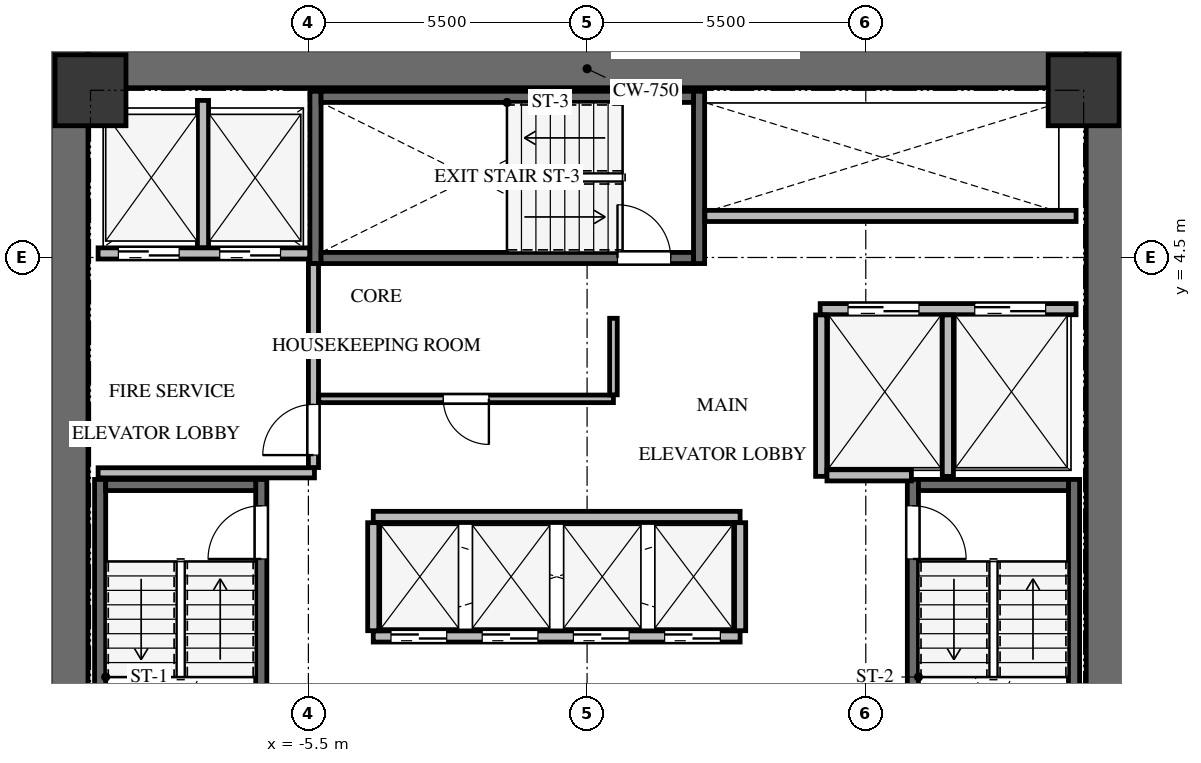
"""IFC4 building model, lengths in metres.
Left out: names, types, materials, properties, quantities, classifications, styles, units other than length and angle.
Written with IfcOpenShell. Run it as: python <this file> out.ifc"""

import sys

from ifc_helpers import new_model, si_unit, direction, frame, frame_2d, origin, origin_2d, place, context, subcontext, project, spatial, rectangle, extrude, source, transform, mapped, element, fill, save


model = new_model("IFC4")
c1 = context("Model", 3, precision=1e-05, world=origin(), true_north=direction((0.0, 1.0)))
c2 = subcontext(c1, "Body", "Model", "MODEL_VIEW")
j1 = project(units=[si_unit("LENGTHUNIT", "METRE"), si_unit("PLANEANGLEUNIT", "RADIAN")], contexts=[c1])
p1 = place(None, origin())
s1 = spatial("IfcSite", under=j1, at=p1, CompositionType="ELEMENT")
p2 = place(p1, origin())
s2 = spatial("IfcBuilding", under=s1, at=p2, CompositionType="ELEMENT")
p3 = place(p2, frame((0.0, 0.0, 140.1)))
s3 = spatial("IfcBuildingStorey", under=s2, at=p3, CompositionType="ELEMENT", Elevation=140.1)
for number, where, z_axis, x_axis in (
    (1, (-10.225, -8.6, 0.0), (0.0, 0.0, 1.0), (0.0, 1.0, 0.0)),
    (2, (10.225, -8.6, 0.0), (0.0, 0.0, 1.0), (0.0, 1.0, 0.0)),
):
    element("IfcWall", number, at=place(p3, frame(where, z_axis=z_axis, x_axis=x_axis)), inside=s3, PredefinedType="SHEAR", context=c2, shape_type="SweptSolid", body=[
        extrude(rectangle(XDim=17.2, YDim=0.75, at=frame_2d((8.6, 0.0))), origin(), (0.0, 0.0, 1.0), 3.0),
    ])
p4 = place(p3, frame((-9.85, 8.225, 0.0), z_axis=(0.0, 0.0, 1.0), x_axis=(1.0, 0.0, 0.0)))
e3 = element("IfcWall", 3, at=p4, inside=s3, PredefinedType="SHEAR", context=c2, shape_type="SweptSolid", body=[
    extrude(rectangle(XDim=19.7, YDim=0.75, at=frame_2d((9.85, 0.0))), origin(), (0.0, 0.0, 1.0), 3.0),
])
p5 = place(p3, frame((-6.43, -7.77, -0.24), z_axis=(0.0, 0.0, 1.0), x_axis=(0.0, 1.0, 0.0)))
e4 = element("IfcWall", 4, at=p5, inside=s3, PredefinedType="SHEAR", context=c2, shape_type="SweptSolid", body=[
    extrude(rectangle(XDim=7.89, YDim=0.22, at=frame_2d((3.945, 0.0))), origin(), (0.0, 0.0, 1.0), 3.0),
])
p6 = place(p5, frame((6.32, 0.0, 0.0)))
e5 = element("IfcOpeningElement", 5, at=p6, cuts=e4, PredefinedType="OPENING", context=c2, shape_type="SweptSolid", body=[
    extrude(rectangle(XDim=1.05, YDim=2.15, at=frame_2d((0.525, 1.075))), frame((0.0, 0.12, 0.0), z_axis=(0.0, -1.0, 0.0), x_axis=(1.0, 0.0, 0.0)), (0.0, 0.0, 1.0), 0.24),
])
p7 = place(p3, frame((-9.61, 0.12, -0.24), z_axis=(0.0, 0.0, 1.0), x_axis=(0.0, -1.0, 0.0)))
e6 = element("IfcWall", 6, at=p7, inside=s3, PredefinedType="SHEAR", context=c2, shape_type="SweptSolid", body=[
    extrude(rectangle(XDim=7.89, YDim=0.22, at=frame_2d((3.945, 0.0))), origin(), (0.0, 0.0, 1.0), 3.0),
])
p8 = place(p3, frame((-6.54, 0.01, -0.24), z_axis=(0.0, 0.0, 1.0), x_axis=(-1.0, 0.0, 0.0)))
e7 = element("IfcWall", 7, at=p8, inside=s3, PredefinedType="SHEAR", context=c2, shape_type="SweptSolid", body=[
    extrude(rectangle(XDim=2.96, YDim=0.22, at=frame_2d((1.48, 0.0))), origin(), (0.0, 0.0, 1.0), 3.0),
])
p9 = place(p3, frame((9.61, -7.77, -0.24), z_axis=(0.0, 0.0, 1.0), x_axis=(0.0, 1.0, 0.0)))
e8 = element("IfcWall", 8, at=p9, inside=s3, PredefinedType="SHEAR", context=c2, shape_type="SweptSolid", body=[
    extrude(rectangle(XDim=7.89, YDim=0.22, at=frame_2d((3.945, 0.0))), origin(), (0.0, 0.0, 1.0), 3.0),
])
p10 = place(p3, frame((6.43, 0.12, -0.24), z_axis=(0.0, 0.0, 1.0), x_axis=(0.0, -1.0, 0.0)))
e9 = element("IfcWall", 9, at=p10, inside=s3, PredefinedType="SHEAR", context=c2, shape_type="SweptSolid", body=[
    extrude(rectangle(XDim=7.89, YDim=0.22, at=frame_2d((3.945, 0.0))), origin(), (0.0, 0.0, 1.0), 3.0),
])
p11 = place(p10, frame((0.52, 0.0, 0.0)))
e10 = element("IfcOpeningElement", 10, at=p11, cuts=e9, PredefinedType="OPENING", context=c2, shape_type="SweptSolid", body=[
    extrude(rectangle(XDim=1.05, YDim=2.15, at=frame_2d((0.525, 1.075))), frame((0.0, 0.12, 0.0), z_axis=(0.0, -1.0, 0.0), x_axis=(1.0, 0.0, 0.0)), (0.0, 0.0, 1.0), 0.24),
])
p12 = place(p3, frame((9.5, 0.01, -0.24), z_axis=(0.0, 0.0, 1.0), x_axis=(-1.0, 0.0, 0.0)))
e11 = element("IfcWall", 11, at=p12, inside=s3, PredefinedType="SHEAR", context=c2, shape_type="SweptSolid", body=[
    extrude(rectangle(XDim=2.96, YDim=0.22, at=frame_2d((1.48, 0.0))), origin(), (0.0, 0.0, 1.0), 3.0),
])
for number, where, z_axis, x_axis in (
    (12, (2.21, 4.38, -0.24), (0.0, 0.0, 1.0), (0.0, 1.0, 0.0)),
    (13, (-5.36, 7.78, -0.24), (0.0, 0.0, 1.0), (0.0, -1.0, 0.0)),
):
    element("IfcWall", number, at=place(p3, frame(where, z_axis=z_axis, x_axis=x_axis)), inside=s3, PredefinedType="SHEAR", context=c2, shape_type="SweptSolid", body=[
        extrude(rectangle(XDim=3.4, YDim=0.22, at=frame_2d((1.7, 0.0))), origin(), (0.0, 0.0, 1.0), 3.0),
    ])
p13 = place(p3, frame((-5.25, 4.49, -0.24), z_axis=(0.0, 0.0, 1.0), x_axis=(1.0, 0.0, 0.0)))
e14 = element("IfcWall", 14, at=p13, inside=s3, PredefinedType="SHEAR", context=c2, shape_type="SweptSolid", body=[
    extrude(rectangle(XDim=7.35, YDim=0.22, at=frame_2d((3.675, 0.0))), origin(), (0.0, 0.0, 1.0), 3.0),
])
p14 = place(p13, frame((5.85, 0.0, 0.0)))
e15 = element("IfcOpeningElement", 15, at=p14, cuts=e14, PredefinedType="OPENING", context=c2, shape_type="SweptSolid", body=[
    extrude(rectangle(XDim=1.05, YDim=2.15, at=frame_2d((0.525, 1.075))), frame((0.0, 0.12, 0.0), z_axis=(0.0, -1.0, 0.0), x_axis=(1.0, 0.0, 0.0)), (0.0, 0.0, 1.0), 0.24),
])
p15 = place(p3, frame((2.1, 7.67, -0.24), z_axis=(0.0, 0.0, 1.0), x_axis=(-1.0, 0.0, 0.0)))
e16 = element("IfcWall", 16, at=p15, inside=s3, PredefinedType="SHEAR", context=c2, shape_type="SweptSolid", body=[
    extrude(rectangle(XDim=7.35, YDim=0.22, at=frame_2d((3.675, 0.0))), origin(), (0.0, 0.0, 1.0), 3.0),
])
m1 = source(origin(), c2, "Body", "SweptSolid", [
    extrude(rectangle(XDim=1.4, YDim=1.4, at=origin_2d()), origin(), (0.0, 0.0, 1.0), 3.0),
])
for number, where, z_axis, x_axis in (
    (17, (9.8, 7.8, -0.24), (0.0, 0.0, 1.0), (1.0, 0.0, 0.0)),
    (18, (-9.8, 7.8, -0.24), (0.0, 0.0, 1.0), (1.0, 0.0, 0.0)),
):
    element("IfcColumn", number, at=place(p3, frame(where, z_axis=z_axis, x_axis=x_axis)), inside=s3, PredefinedType="COLUMN", context=c2, shape_type="MappedRepresentation", body=[
        mapped(m1, transform((0.0, 0.0, 0.0), x_axis=(1.0, 0.0, 0.0), y_axis=(0.0, 1.0, 0.0), z_axis=(0.0, 0.0, 1.0), scale=1.0)),
    ])
p16 = place(p3, frame((-9.65, 4.58, 0.0), z_axis=(0.0, 0.0, 1.0), x_axis=(1.0, 0.0, 0.0)))
e19 = element("IfcWall", 19, at=p16, inside=s3, PredefinedType="SOLIDWALL", context=c2, shape_type="SweptSolid", body=[
    extrude(rectangle(XDim=4.175, YDim=0.22, at=frame_2d((2.087, 0.0))), origin(), (0.0, 0.0, 1.0), 2.745),
])
p17 = place(p16, frame((0.4, 0.0, 0.0)))
e20 = element("IfcOpeningElement", 20, at=p17, cuts=e19, PredefinedType="OPENING", context=c2, shape_type="SweptSolid", body=[
    extrude(rectangle(XDim=1.2, YDim=2.15, at=frame_2d((0.6, 1.075))), frame((0.0, 0.12, 0.0), z_axis=(0.0, -1.0, 0.0), x_axis=(1.0, 0.0, 0.0)), (0.0, 0.0, 1.0), 0.24),
])
p18 = place(p16, frame((2.4, 0.0, 0.0)))
e21 = element("IfcOpeningElement", 21, at=p18, cuts=e19, PredefinedType="OPENING", context=c2, shape_type="SweptSolid", body=[
    extrude(rectangle(XDim=1.2, YDim=2.15, at=frame_2d((0.6, 1.075))), frame((0.0, 0.12, 0.0), z_axis=(0.0, -1.0, 0.0), x_axis=(1.0, 0.0, 0.0)), (0.0, 0.0, 1.0), 0.24),
])
p19 = place(p3, frame((-7.58, 4.694, 0.0), z_axis=(0.0, 0.0, 1.0), x_axis=(0.0, 1.0, 0.0)))
e22 = element("IfcWall", 22, at=p19, inside=s3, PredefinedType="SOLIDWALL", context=c2, shape_type="SweptSolid", body=[
    extrude(rectangle(XDim=2.906, YDim=0.22, at=frame_2d((1.453, 0.0))), origin(), (0.0, 0.0, 1.0), 2.745),
])
p20 = place(p3, frame((-9.65, 0.25, 0.0), z_axis=(0.0, 0.0, 1.0), x_axis=(1.0, 0.0, 0.0)))
e23 = element("IfcWall", 23, at=p20, inside=s3, PredefinedType="SOLIDWALL", context=c2, shape_type="SweptSolid", body=[
    extrude(rectangle(XDim=4.27, YDim=0.2, at=frame_2d((2.135, 0.0))), origin(), (0.0, 0.0, 1.0), 2.745),
])
p21 = place(p3, frame((-5.4, 0.354, 0.0), z_axis=(0.0, 0.0, 1.0), x_axis=(0.0, 1.0, 0.0)))
e24 = element("IfcWall", 24, at=p21, inside=s3, PredefinedType="SOLIDWALL", context=c2, shape_type="SweptSolid", body=[
    extrude(rectangle(XDim=4.026, YDim=0.2, at=frame_2d((2.013, 0.0))), origin(), (0.0, 0.0, 1.0), 2.745),
])
p22 = place(p21, frame((0.246, 0.0, 0.0)))
e25 = element("IfcOpeningElement", 25, at=p22, cuts=e24, PredefinedType="OPENING", context=c2, shape_type="SweptSolid", body=[
    extrude(rectangle(XDim=1.0, YDim=2.15, at=frame_2d((0.5, 1.075))), frame((0.0, 0.11, 0.0), z_axis=(0.0, -1.0, 0.0), x_axis=(1.0, 0.0, 0.0)), (0.0, 0.0, 1.0), 0.22),
])
p23 = place(p3, frame((4.6, 3.48, 0.0), z_axis=(0.0, 0.0, 1.0), x_axis=(1.0, 0.0, 0.0)))
e26 = element("IfcWall", 26, at=p23, inside=s3, PredefinedType="SOLIDWALL", context=c2, shape_type="SweptSolid", body=[
    extrude(rectangle(XDim=5.05, YDim=0.22, at=frame_2d((2.525, 0.0))), origin(), (0.0, 0.0, 1.0), 2.745),
])
p24 = place(p23, frame((0.55, 0.0, 0.0)))
e27 = element("IfcOpeningElement", 27, at=p24, cuts=e26, PredefinedType="OPENING", context=c2, shape_type="SweptSolid", body=[
    extrude(rectangle(XDim=1.4, YDim=2.15, at=frame_2d((0.7, 1.075))), frame((0.0, 0.12, 0.0), z_axis=(0.0, -1.0, 0.0), x_axis=(1.0, 0.0, 0.0)), (0.0, 0.0, 1.0), 0.24),
])
p25 = place(p23, frame((3.05, 0.0, 0.0)))
e28 = element("IfcOpeningElement", 28, at=p25, cuts=e26, PredefinedType="OPENING", context=c2, shape_type="SweptSolid", body=[
    extrude(rectangle(XDim=1.4, YDim=2.15, at=frame_2d((0.7, 1.075))), frame((0.0, 0.12, 0.0), z_axis=(0.0, -1.0, 0.0), x_axis=(1.0, 0.0, 0.0)), (0.0, 0.0, 1.0), 0.24),
])
for number, where, z_axis, x_axis in (
    (29, (4.62, 0.18, 0.0), (0.0, 0.0, 1.0), (0.0, 1.0, 0.0)),
    (30, (7.12, 0.18, 0.0), (0.0, 0.0, 1.0), (0.0, 1.0, 0.0)),
):
    element("IfcWall", number, at=place(p3, frame(where, z_axis=z_axis, x_axis=x_axis)), inside=s3, PredefinedType="SOLIDWALL", context=c2, shape_type="SweptSolid", body=[
        extrude(rectangle(XDim=3.186, YDim=0.22, at=frame_2d((1.593, 0.0))), origin(), (0.0, 0.0, 1.0), 2.745),
    ])
p26 = place(p3, frame((4.734, 0.2, 0.0), z_axis=(0.0, 0.0, 1.0), x_axis=(1.0, 0.0, 0.0)))
e31 = element("IfcWall", 31, at=p26, inside=s3, PredefinedType="SOLIDWALL", context=c2, shape_type="SweptSolid", body=[
    extrude(rectangle(XDim=1.666, YDim=0.22, at=frame_2d((0.833, 0.0))), origin(), (0.0, 0.0, 1.0), 2.745),
])
p27 = place(p3, frame((-4.22, -2.98, 0.0), z_axis=(0.0, 0.0, 1.0), x_axis=(1.0, 0.0, 0.0)))
e32 = element("IfcWall", 32, at=p27, inside=s3, PredefinedType="SOLIDWALL", context=c2, shape_type="SweptSolid", body=[
    extrude(rectangle(XDim=7.24, YDim=0.22, at=frame_2d((3.62, 0.0))), origin(), (0.0, 0.0, 1.0), 2.745),
])
p28 = place(p27, frame((0.35, 0.0, 0.0)))
e33 = element("IfcOpeningElement", 33, at=p28, cuts=e32, PredefinedType="OPENING", context=c2, shape_type="SweptSolid", body=[
    extrude(rectangle(XDim=1.1, YDim=2.15, at=frame_2d((0.55, 1.075))), frame((0.0, 0.12, 0.0), z_axis=(0.0, -1.0, 0.0), x_axis=(1.0, 0.0, 0.0)), (0.0, 0.0, 1.0), 0.24),
])
p29 = place(p27, frame((2.15, 0.0, 0.0)))
e34 = element("IfcOpeningElement", 34, at=p29, cuts=e32, PredefinedType="OPENING", context=c2, shape_type="SweptSolid", body=[
    extrude(rectangle(XDim=1.1, YDim=2.15, at=frame_2d((0.55, 1.075))), frame((0.0, 0.12, 0.0), z_axis=(0.0, -1.0, 0.0), x_axis=(1.0, 0.0, 0.0)), (0.0, 0.0, 1.0), 0.24),
])
p30 = place(p27, frame((3.95, 0.0, 0.0)))
e35 = element("IfcOpeningElement", 35, at=p30, cuts=e32, PredefinedType="OPENING", context=c2, shape_type="SweptSolid", body=[
    extrude(rectangle(XDim=1.1, YDim=2.15, at=frame_2d((0.55, 1.075))), frame((0.0, 0.12, 0.0), z_axis=(0.0, -1.0, 0.0), x_axis=(1.0, 0.0, 0.0)), (0.0, 0.0, 1.0), 0.24),
])
p31 = place(p27, frame((5.75, 0.0, 0.0)))
e36 = element("IfcOpeningElement", 36, at=p31, cuts=e32, PredefinedType="OPENING", context=c2, shape_type="SweptSolid", body=[
    extrude(rectangle(XDim=1.1, YDim=2.15, at=frame_2d((0.55, 1.075))), frame((0.0, 0.12, 0.0), z_axis=(0.0, -1.0, 0.0), x_axis=(1.0, 0.0, 0.0)), (0.0, 0.0, 1.0), 0.24),
])
p32 = place(p3, frame((-4.22, -0.62, 0.0), z_axis=(0.0, 0.0, 1.0), x_axis=(1.0, 0.0, 0.0)))
e37 = element("IfcWall", 37, at=p32, inside=s3, PredefinedType="SOLIDWALL", context=c2, shape_type="SweptSolid", body=[
    extrude(rectangle(XDim=7.24, YDim=0.22, at=frame_2d((3.62, 0.0))), origin(), (0.0, 0.0, 1.0), 2.745),
])
for number, where, z_axis, x_axis in (
    (38, (-4.22, -2.866, 0.0), (0.0, 0.0, 1.0), (0.0, 1.0, 0.0)),
    (39, (3.02, -2.866, 0.0), (0.0, 0.0, 1.0), (0.0, 1.0, 0.0)),
):
    element("IfcWall", number, at=place(p3, frame(where, z_axis=z_axis, x_axis=x_axis)), inside=s3, PredefinedType="SOLIDWALL", context=c2, shape_type="SweptSolid", body=[
        extrude(rectangle(XDim=2.132, YDim=0.22, at=frame_2d((1.066, 0.0))), origin(), (0.0, 0.0, 1.0), 2.745),
    ])
p33 = place(p3, frame((2.325, 5.32, 0.0), z_axis=(0.0, 0.0, 1.0), x_axis=(1.0, 0.0, 0.0)))
e40 = element("IfcWall", 40, at=p33, inside=s3, PredefinedType="SOLIDWALL", context=c2, shape_type="SweptSolid", body=[
    extrude(rectangle(XDim=7.325, YDim=0.22, at=frame_2d((3.663, 0.0))), origin(), (0.0, 0.0, 1.0), 2.745),
])
p34 = place(p3, frame((0.52, 1.71, 0.0), z_axis=(0.0, 0.0, 1.0), x_axis=(-1.0, 0.0, 0.0)))
e41 = element("IfcWall", 41, at=p34, inside=s3, PredefinedType="PARTITIONING", context=c2, shape_type="SweptSolid", body=[
    extrude(rectangle(XDim=5.816, YDim=0.15, at=frame_2d((2.908, 0.0))), origin(), (0.0, 0.0, 1.0), 2.745),
])
p35 = place(p34, frame((2.458, 0.0, 0.0)))
e42 = element("IfcOpeningElement", 42, at=p35, cuts=e41, PredefinedType="OPENING", context=c2, shape_type="SweptSolid", body=[
    extrude(rectangle(XDim=0.9, YDim=2.05, at=frame_2d((0.45, 1.025))), frame((0.0, 0.085, 0.0), z_axis=(0.0, -1.0, 0.0), x_axis=(1.0, 0.0, 0.0)), (0.0, 0.0, 1.0), 0.17),
])
p36 = place(p3, frame((0.52, 3.3, 0.0), z_axis=(0.0, 0.0, 1.0), x_axis=(0.0, -1.0, 0.0)))
e43 = element("IfcWall", 43, at=p36, inside=s3, PredefinedType="PARTITIONING", context=c2, shape_type="SweptSolid", body=[
    extrude(rectangle(XDim=1.511, YDim=0.15, at=frame_2d((0.755, 0.0))), origin(), (0.0, 0.0, 1.0), 2.745),
])
m2 = source(origin(), c2, "Body", "SweptSolid", [
    extrude(rectangle(XDim=1.05, YDim=2.15, at=frame_2d((0.525, 1.075))), frame((0.0, 0.025, 0.0), z_axis=(0.0, -1.0, 0.0), x_axis=(1.0, 0.0, 0.0)), (0.0, 0.0, 1.0), 0.05),
])
p37 = place(p6, origin())
e44 = element("IfcDoor", 44, at=p37, inside=s3, OperationType="SINGLE_SWING_LEFT", PredefinedType="DOOR", context=c2, shape_type="MappedRepresentation", body=[
    mapped(m2, transform((0.0, 0.0, 0.0), x_axis=(1.0, 0.0, 0.0), y_axis=(0.0, 1.0, 0.0), z_axis=(0.0, 0.0, 1.0), scale=1.0)),
])
fill(e5, e44)
m3 = source(origin(), c2, "Body", "SweptSolid", [
    extrude(rectangle(XDim=1.05, YDim=2.15, at=frame_2d((0.525, 1.075))), frame((0.0, 0.025, 0.0), z_axis=(0.0, -1.0, 0.0), x_axis=(1.0, 0.0, 0.0)), (0.0, 0.0, 1.0), 0.05),
])
p38 = place(p11, origin())
e45 = element("IfcDoor", 45, at=p38, inside=s3, OperationType="SINGLE_SWING_RIGHT", PredefinedType="DOOR", context=c2, shape_type="MappedRepresentation", body=[
    mapped(m3, transform((0.0, 0.0, 0.0), x_axis=(1.0, 0.0, 0.0), y_axis=(0.0, 1.0, 0.0), z_axis=(0.0, 0.0, 1.0), scale=1.0)),
])
fill(e10, e45)
p39 = place(p14, origin())
e46 = element("IfcDoor", 46, at=p39, inside=s3, OperationType="SINGLE_SWING_LEFT", PredefinedType="DOOR", context=c2, shape_type="MappedRepresentation", body=[
    mapped(m2, transform((0.0, 0.0, 0.0), x_axis=(1.0, 0.0, 0.0), y_axis=(0.0, 1.0, 0.0), z_axis=(0.0, 0.0, 1.0), scale=1.0)),
])
fill(e15, e46)
m4 = source(origin(), c2, "Body", "SweptSolid", [
    extrude(rectangle(XDim=1.2, YDim=2.15, at=frame_2d((0.6, 1.075))), frame((0.0, 0.025, 0.0), z_axis=(0.0, -1.0, 0.0), x_axis=(1.0, 0.0, 0.0)), (0.0, 0.0, 1.0), 0.05),
])
p40 = place(p17, origin())
e47 = element("IfcDoor", 47, at=p40, inside=s3, OperationType="DOUBLE_DOOR_SLIDING", PredefinedType="DOOR", context=c2, shape_type="MappedRepresentation", body=[
    mapped(m4, transform((0.0, 0.0, 0.0), x_axis=(1.0, 0.0, 0.0), y_axis=(0.0, 1.0, 0.0), z_axis=(0.0, 0.0, 1.0), scale=1.0)),
])
fill(e20, e47)
p41 = place(p18, origin())
e48 = element("IfcDoor", 48, at=p41, inside=s3, OperationType="DOUBLE_DOOR_SLIDING", PredefinedType="DOOR", context=c2, shape_type="MappedRepresentation", body=[
    mapped(m4, transform((0.0, 0.0, 0.0), x_axis=(1.0, 0.0, 0.0), y_axis=(0.0, 1.0, 0.0), z_axis=(0.0, 0.0, 1.0), scale=1.0)),
])
fill(e21, e48)
m5 = source(origin(), c2, "Body", "SweptSolid", [
    extrude(rectangle(XDim=1.0, YDim=2.15, at=frame_2d((0.5, 1.075))), frame((0.0, 0.025, 0.0), z_axis=(0.0, -1.0, 0.0), x_axis=(1.0, 0.0, 0.0)), (0.0, 0.0, 1.0), 0.05),
])
p42 = place(p22, origin())
e49 = element("IfcDoor", 49, at=p42, inside=s3, OperationType="SINGLE_SWING_LEFT", PredefinedType="DOOR", context=c2, shape_type="MappedRepresentation", body=[
    mapped(m5, transform((0.0, 0.0, 0.0), x_axis=(1.0, 0.0, 0.0), y_axis=(0.0, 1.0, 0.0), z_axis=(0.0, 0.0, 1.0), scale=1.0)),
])
fill(e25, e49)
m6 = source(origin(), c2, "Body", "SweptSolid", [
    extrude(rectangle(XDim=1.4, YDim=2.15, at=frame_2d((0.7, 1.075))), frame((0.0, 0.025, 0.0), z_axis=(0.0, -1.0, 0.0), x_axis=(1.0, 0.0, 0.0)), (0.0, 0.0, 1.0), 0.05),
])
p43 = place(p24, origin())
e50 = element("IfcDoor", 50, at=p43, inside=s3, OperationType="DOUBLE_DOOR_SLIDING", PredefinedType="DOOR", context=c2, shape_type="MappedRepresentation", body=[
    mapped(m6, transform((0.0, 0.0, 0.0), x_axis=(1.0, 0.0, 0.0), y_axis=(0.0, 1.0, 0.0), z_axis=(0.0, 0.0, 1.0), scale=1.0)),
])
fill(e27, e50)
p44 = place(p25, origin())
e51 = element("IfcDoor", 51, at=p44, inside=s3, OperationType="DOUBLE_DOOR_SLIDING", PredefinedType="DOOR", context=c2, shape_type="MappedRepresentation", body=[
    mapped(m6, transform((0.0, 0.0, 0.0), x_axis=(1.0, 0.0, 0.0), y_axis=(0.0, 1.0, 0.0), z_axis=(0.0, 0.0, 1.0), scale=1.0)),
])
fill(e28, e51)
m7 = source(origin(), c2, "Body", "SweptSolid", [
    extrude(rectangle(XDim=1.1, YDim=2.15, at=frame_2d((0.55, 1.075))), frame((0.0, 0.025, 0.0), z_axis=(0.0, -1.0, 0.0), x_axis=(1.0, 0.0, 0.0)), (0.0, 0.0, 1.0), 0.05),
])
p45 = place(p28, origin())
e52 = element("IfcDoor", 52, at=p45, inside=s3, OperationType="DOUBLE_DOOR_SLIDING", PredefinedType="DOOR", context=c2, shape_type="MappedRepresentation", body=[
    mapped(m7, transform((0.0, 0.0, 0.0), x_axis=(1.0, 0.0, 0.0), y_axis=(0.0, 1.0, 0.0), z_axis=(0.0, 0.0, 1.0), scale=1.0)),
])
fill(e33, e52)
p46 = place(p29, origin())
e53 = element("IfcDoor", 53, at=p46, inside=s3, OperationType="DOUBLE_DOOR_SLIDING", PredefinedType="DOOR", context=c2, shape_type="MappedRepresentation", body=[
    mapped(m7, transform((0.0, 0.0, 0.0), x_axis=(1.0, 0.0, 0.0), y_axis=(0.0, 1.0, 0.0), z_axis=(0.0, 0.0, 1.0), scale=1.0)),
])
fill(e34, e53)
p47 = place(p30, origin())
e54 = element("IfcDoor", 54, at=p47, inside=s3, OperationType="DOUBLE_DOOR_SLIDING", PredefinedType="DOOR", context=c2, shape_type="MappedRepresentation", body=[
    mapped(m7, transform((0.0, 0.0, 0.0), x_axis=(1.0, 0.0, 0.0), y_axis=(0.0, 1.0, 0.0), z_axis=(0.0, 0.0, 1.0), scale=1.0)),
])
fill(e35, e54)
p48 = place(p31, origin())
e55 = element("IfcDoor", 55, at=p48, inside=s3, OperationType="DOUBLE_DOOR_SLIDING", PredefinedType="DOOR", context=c2, shape_type="MappedRepresentation", body=[
    mapped(m7, transform((0.0, 0.0, 0.0), x_axis=(1.0, 0.0, 0.0), y_axis=(0.0, 1.0, 0.0), z_axis=(0.0, 0.0, 1.0), scale=1.0)),
])
fill(e36, e55)
m8 = source(origin(), c2, "Body", "SweptSolid", [
    extrude(rectangle(XDim=0.9, YDim=2.05, at=frame_2d((0.45, 1.025))), frame((0.0, 0.025, 0.0), z_axis=(0.0, -1.0, 0.0), x_axis=(1.0, 0.0, 0.0)), (0.0, 0.0, 1.0), 0.05),
])
p49 = place(p35, origin())
e56 = element("IfcDoor", 56, at=p49, inside=s3, OperationType="SINGLE_SWING_LEFT", PredefinedType="DOOR", context=c2, shape_type="MappedRepresentation", body=[
    mapped(m8, transform((0.0, 0.0, 0.0), x_axis=(1.0, 0.0, 0.0), y_axis=(0.0, 1.0, 0.0), z_axis=(0.0, 0.0, 1.0), scale=1.0)),
])
fill(e42, e56)
save(model, sys.argv[1])
